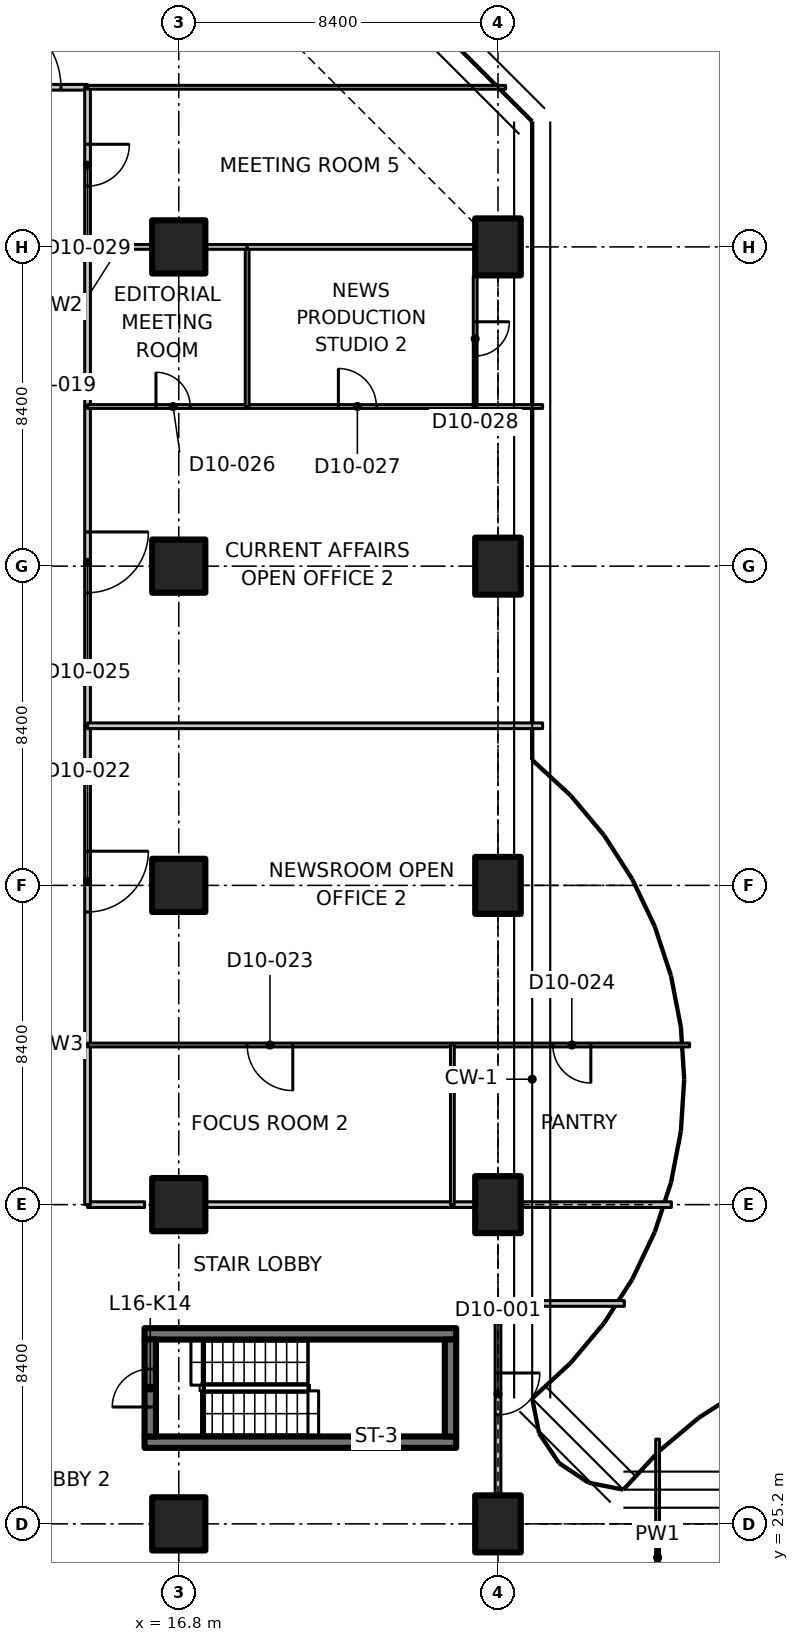
"""IFC4 building model, lengths in metres.
Left out: names, types, materials, properties, quantities, classifications, styles, units other than length and angle.
Written with IfcOpenShell. Run it as: python <this file> out.ifc"""

import sys

from ifc_helpers import new_model, si_unit, direction, frame, frame_2d, origin, origin_2d, place, context, subcontext, project, spatial, polyline, rectangle, outline, extrude, element, fill, save


model = new_model("IFC4")
c1 = context("Model", 3, precision=1e-05, world=origin(), true_north=direction((0.0, 1.0)))
c2 = subcontext(c1, "Body", "Model", "MODEL_VIEW")
j1 = project(units=[si_unit("LENGTHUNIT", "METRE"), si_unit("PLANEANGLEUNIT", "RADIAN")], contexts=[c1])
p1 = place(None, origin())
s1 = spatial("IfcSite", under=j1, at=p1, CompositionType="ELEMENT")
p2 = place(p1, origin())
s2 = spatial("IfcBuilding", under=s1, at=p2, CompositionType="ELEMENT")
p3 = place(p2, frame((0.0, 0.0, 72.5)))
s3 = spatial("IfcBuildingStorey", under=s2, at=p3, CompositionType="ELEMENT", Elevation=72.5)
for number, where, z_axis, x_axis in (
    (1, (16.8, 25.2, 0.0), (0.0, 0.0, 1.0), (1.0, 0.0, 0.0)),
    (2, (16.8, 33.6, 0.0), (0.0, 0.0, 1.0), (1.0, 0.0, 0.0)),
    (3, (16.8, 42.0, 0.0), (0.0, 0.0, 1.0), (1.0, 0.0, 0.0)),
    (4, (16.8, 50.4, 0.0), (0.0, 0.0, 1.0), (1.0, 0.0, 0.0)),
    (5, (16.8, 58.8, 0.0), (0.0, 0.0, 1.0), (1.0, 0.0, 0.0)),
):
    element("IfcColumn", number, at=place(p3, frame(where, z_axis=z_axis, x_axis=x_axis)), inside=s3, PredefinedType="COLUMN", context=c2, shape_type="SweptSolid", body=[
        extrude(rectangle(XDim=1.4, YDim=1.4, at=origin_2d()), origin(), (0.0, 0.0, 1.0), 3.35),
    ])
for number, where, z_axis, x_axis in (
    (6, (25.2, 25.2, 0.0), (0.0, 0.0, 1.0), (1.0, 0.0, 0.0)),
    (7, (25.2, 33.6, 0.0), (0.0, 0.0, 1.0), (1.0, 0.0, 0.0)),
    (8, (25.2, 42.0, 0.0), (0.0, 0.0, 1.0), (1.0, 0.0, 0.0)),
    (9, (25.2, 50.4, 0.0), (0.0, 0.0, 1.0), (1.0, 0.0, 0.0)),
    (10, (25.2, 58.8, 0.0), (0.0, 0.0, 1.0), (1.0, 0.0, 0.0)),
):
    element("IfcColumn", number, at=place(p3, frame(where, z_axis=z_axis, x_axis=x_axis)), inside=s3, PredefinedType="COLUMN", context=c2, shape_type="SweptSolid", body=[
        extrude(rectangle(XDim=1.2, YDim=1.5, at=origin_2d()), origin(), (0.0, 0.0, 1.0), 3.35),
    ])
for number, where, z_axis, x_axis in (
    (11, (15.9, 27.35, 0.0), (0.0, 0.0, 1.0), (1.0, 0.0, 0.0)),
    (12, (15.9, 30.2, 0.0), (0.0, 0.0, 1.0), (1.0, 0.0, 0.0)),
):
    element("IfcWall", number, at=place(p3, frame(where, z_axis=z_axis, x_axis=x_axis)), inside=s3, PredefinedType="SHEAR", context=c2, shape_type="SweptSolid", body=[
        extrude(rectangle(XDim=8.2, YDim=0.3, at=frame_2d((4.1, 0.0))), origin(), (0.0, 0.0, 1.0), 3.35),
    ])
p4 = place(p3, frame((16.05, 27.5, 0.0), z_axis=(0.0, 0.0, 1.0), x_axis=(0.0, 1.0, 0.0)))
e13 = element("IfcWall", 13, at=p4, inside=s3, PredefinedType="SHEAR", context=c2, shape_type="SweptSolid", body=[
    extrude(rectangle(XDim=2.55, YDim=0.3, at=frame_2d((1.275, 0.0))), origin(), (0.0, 0.0, 1.0), 3.35),
])
p5 = place(p4, frame((0.775, 0.0, 0.0)))
e14 = element("IfcOpeningElement", 14, at=p5, cuts=e13, PredefinedType="OPENING", context=c2, shape_type="SweptSolid", body=[
    extrude(rectangle(XDim=1.0, YDim=2.1, at=frame_2d((0.5, 1.05))), frame((0.0, 0.16, 0.0), z_axis=(0.0, -1.0, 0.0), x_axis=(1.0, 0.0, 0.0)), (0.0, 0.0, 1.0), 0.32),
])
p6 = place(p3, frame((23.95, 27.5, 0.0), z_axis=(0.0, 0.0, 1.0), x_axis=(0.0, 1.0, 0.0)))
e15 = element("IfcWall", 15, at=p6, inside=s3, PredefinedType="SHEAR", context=c2, shape_type="SweptSolid", body=[
    extrude(rectangle(XDim=2.55, YDim=0.3, at=frame_2d((1.275, 0.0))), origin(), (0.0, 0.0, 1.0), 3.35),
])
p7 = place(p3, frame((29.4, 27.429, 0.0), z_axis=(0.0, 0.0, 1.0), x_axis=(0.0, -1.0, 0.0)))
e16 = element("IfcWall", 16, at=p7, inside=s3, PredefinedType="PARTITIONING", context=c2, shape_type="SweptSolid", body=[
    extrude(outline(polyline([(0.0, 0.0), (6.229, 0.0), (6.229, 3.33), (2.679, 3.33), (2.677, 2.98), (1.781, 2.98), (1.779, 3.33), (0.154, 3.33), (0.0, 3.33), (0.0, 0.0)])), frame((0.0, 0.05, 0.0), z_axis=(0.0, -1.0, 0.0), x_axis=(1.0, 0.0, 0.0)), (0.0, 0.0, 1.0), 0.1),
])
p8 = place(p3, frame((25.2, 31.0, 0.0), z_axis=(0.0, 0.0, 1.0), x_axis=(0.0, -1.0, 0.0)))
e17 = element("IfcWall", 17, at=p8, inside=s3, PredefinedType="PARTITIONING", context=c2, shape_type="SweptSolid", body=[
    extrude(outline(polyline([(0.0, 0.0), (5.03, 0.0), (5.03, 2.98), (0.0, 2.98), (0.0, 0.0)])), frame((0.0, 0.075, 0.0), z_axis=(0.0, -1.0, 0.0), x_axis=(1.0, 0.0, 0.0)), (0.0, 0.0, 1.0), 0.15),
])
p9 = place(p8, frame((1.83, 0.0, 0.0)))
e18 = element("IfcOpeningElement", 18, at=p9, cuts=e17, PredefinedType="OPENING", context=c2, shape_type="SweptSolid", body=[
    extrude(rectangle(XDim=1.1, YDim=2.1, at=frame_2d((0.55, 1.05))), frame((0.0, 0.085, 0.0), z_axis=(0.0, -1.0, 0.0), x_axis=(1.0, 0.0, 0.0)), (0.0, 0.0, 1.0), 0.17),
])
p10 = place(p3, frame((25.2, 31.0, 0.0), z_axis=(0.0, 0.0, 1.0), x_axis=(1.0, 0.0, 0.0)))
e19 = element("IfcWall", 19, at=p10, inside=s3, PredefinedType="PARTITIONING", context=c2, shape_type="SweptSolid", body=[
    extrude(rectangle(XDim=3.324, YDim=0.15, at=frame_2d((1.662, 0.0))), origin(), (0.0, 0.0, 1.0), 2.98),
])
p11 = place(p3, frame((14.4, 33.6, 0.0), z_axis=(0.0, 0.0, 1.0), x_axis=(1.0, 0.0, 0.0)))
e20 = element("IfcWall", 20, at=p11, inside=s3, PredefinedType="PARTITIONING", context=c2, shape_type="SweptSolid", body=[
    extrude(rectangle(XDim=1.5, YDim=0.15, at=frame_2d((0.75, 0.0))), origin(), (0.0, 0.0, 1.0), 3.33),
])
p12 = place(p3, frame((17.52, 33.6, 0.0), z_axis=(0.0, 0.0, 1.0), x_axis=(1.0, 0.0, 0.0)))
e21 = element("IfcWall", 21, at=p12, inside=s3, PredefinedType="PARTITIONING", context=c2, shape_type="SweptSolid", body=[
    extrude(rectangle(XDim=6.48, YDim=0.15, at=frame_2d((3.24, 0.0))), origin(), (0.0, 0.0, 1.0), 3.33),
])
p13 = place(p3, frame((24.0, 33.6, 0.0), z_axis=(0.0, 0.0, 1.0), x_axis=(1.0, 0.0, 0.0)))
e22 = element("IfcWall", 22, at=p13, inside=s3, PredefinedType="PARTITIONING", context=c2, shape_type="SweptSolid", body=[
    extrude(rectangle(XDim=0.58, YDim=0.15, at=frame_2d((0.29, 0.0))), origin(), (0.0, 0.0, 1.0), 3.33),
])
p14 = place(p3, frame((25.82, 33.6, 0.0), z_axis=(0.0, 0.0, 1.0), x_axis=(1.0, 0.0, 0.0)))
e23 = element("IfcWall", 23, at=p14, inside=s3, PredefinedType="PARTITIONING", context=c2, shape_type="SweptSolid", body=[
    extrude(rectangle(XDim=3.942, YDim=0.15, at=frame_2d((1.971, 0.0))), origin(), (0.0, 0.0, 1.0), 2.98),
])
p15 = place(p3, frame((10.8, 63.0, 0.0), z_axis=(0.0, 0.0, 1.0), x_axis=(1.0, 0.0, 0.0)))
e24 = element("IfcWall", 24, at=p15, inside=s3, PredefinedType="PARTITIONING", context=c2, shape_type="SweptSolid", body=[
    extrude(rectangle(XDim=3.6, YDim=0.15, at=frame_2d((1.8, 0.0))), origin(), (0.0, 0.0, 1.0), 3.33),
])
p16 = place(p15, frame((0.9, 0.0, 0.0)))
e25 = element("IfcOpeningElement", 25, at=p16, cuts=e24, PredefinedType="OPENING", context=c2, shape_type="SweptSolid", body=[
    extrude(rectangle(XDim=2.0, YDim=2.4, at=frame_2d((1.0, 1.2))), frame((0.0, 0.085, 0.0), z_axis=(0.0, -1.0, 0.0), x_axis=(1.0, 0.0, 0.0)), (0.0, 0.0, 1.0), 0.17),
])
p17 = place(p3, frame((14.4, 46.2, 0.0), z_axis=(0.0, 0.0, 1.0), x_axis=(0.0, -1.0, 0.0)))
e26 = element("IfcWall", 26, at=p17, inside=s3, PredefinedType="PARTITIONING", context=c2, shape_type="SweptSolid", body=[
    extrude(rectangle(XDim=8.4, YDim=0.15, at=frame_2d((4.2, 0.0))), origin(), (0.0, 0.0, 1.0), 3.33),
])
p18 = place(p17, frame((3.3, 0.0, 0.0)))
e27 = element("IfcOpeningElement", 27, at=p18, cuts=e26, PredefinedType="OPENING", context=c2, shape_type="SweptSolid", body=[
    extrude(rectangle(XDim=1.6, YDim=2.1, at=frame_2d((0.8, 1.05))), frame((0.0, 0.085, 0.0), z_axis=(0.0, -1.0, 0.0), x_axis=(1.0, 0.0, 0.0)), (0.0, 0.0, 1.0), 0.17),
])
p19 = place(p3, frame((14.4, 37.8, 0.0), z_axis=(0.0, 0.0, 1.0), x_axis=(0.0, -1.0, 0.0)))
e28 = element("IfcWall", 28, at=p19, inside=s3, PredefinedType="PARTITIONING", context=c2, shape_type="SweptSolid", body=[
    extrude(rectangle(XDim=4.2, YDim=0.15, at=frame_2d((2.1, 0.0))), origin(), (0.0, 0.0, 1.0), 3.33),
])
p20 = place(p3, frame((14.4, 54.6, 0.0), z_axis=(0.0, 0.0, 1.0), x_axis=(0.0, -1.0, 0.0)))
e29 = element("IfcWall", 29, at=p20, inside=s3, PredefinedType="PARTITIONING", context=c2, shape_type="SweptSolid", body=[
    extrude(rectangle(XDim=8.4, YDim=0.15, at=frame_2d((4.2, 0.0))), origin(), (0.0, 0.0, 1.0), 3.33),
])
p21 = place(p20, frame((3.3, 0.0, 0.0)))
e30 = element("IfcOpeningElement", 30, at=p21, cuts=e29, PredefinedType="OPENING", context=c2, shape_type="SweptSolid", body=[
    extrude(rectangle(XDim=1.6, YDim=2.1, at=frame_2d((0.8, 1.05))), frame((0.0, 0.085, 0.0), z_axis=(0.0, -1.0, 0.0), x_axis=(1.0, 0.0, 0.0)), (0.0, 0.0, 1.0), 0.17),
])
p22 = place(p3, frame((14.4, 58.8, 0.0), z_axis=(0.0, 0.0, 1.0), x_axis=(0.0, -1.0, 0.0)))
e31 = element("IfcWall", 31, at=p22, inside=s3, PredefinedType="PARTITIONING", context=c2, shape_type="SweptSolid", body=[
    extrude(rectangle(XDim=4.2, YDim=0.15, at=frame_2d((2.1, 0.0))), origin(), (0.0, 0.0, 1.0), 3.33),
])
p23 = place(p3, frame((14.4, 63.0, 0.0), z_axis=(0.0, 0.0, 1.0), x_axis=(0.0, -1.0, 0.0)))
e32 = element("IfcWall", 32, at=p23, inside=s3, PredefinedType="PARTITIONING", context=c2, shape_type="SweptSolid", body=[
    extrude(rectangle(XDim=4.2, YDim=0.15, at=frame_2d((2.1, 0.0))), origin(), (0.0, 0.0, 1.0), 3.33),
])
p24 = place(p23, frame((1.5, 0.0, 0.0)))
e33 = element("IfcOpeningElement", 33, at=p24, cuts=e32, PredefinedType="OPENING", context=c2, shape_type="SweptSolid", body=[
    extrude(rectangle(XDim=1.1, YDim=2.1, at=frame_2d((0.55, 1.05))), frame((0.0, 0.085, 0.0), z_axis=(0.0, -1.0, 0.0), x_axis=(1.0, 0.0, 0.0)), (0.0, 0.0, 1.0), 0.17),
])
p25 = place(p3, frame((25.4, 63.0, 0.0), z_axis=(0.0, 0.0, 1.0), x_axis=(-1.0, 0.0, 0.0)))
e34 = element("IfcWall", 34, at=p25, inside=s3, PredefinedType="PARTITIONING", context=c2, shape_type="SweptSolid", body=[
    extrude(outline(polyline([(0.0, 0.0), (11.0, 0.0), (11.0, 3.33), (5.066, 3.33), (5.064, 2.98), (3.736, 2.98), (3.734, 3.33), (0.0, 3.33), (0.0, 0.0)])), frame((0.0, 0.05, 0.0), z_axis=(0.0, -1.0, 0.0), x_axis=(1.0, 0.0, 0.0)), (0.0, 0.0, 1.0), 0.1),
])
p26 = place(p3, frame((24.0, 37.8, 0.0), z_axis=(0.0, 0.0, 1.0), x_axis=(-1.0, 0.0, 0.0)))
e35 = element("IfcWall", 35, at=p26, inside=s3, PredefinedType="PARTITIONING", context=c2, shape_type="SweptSolid", body=[
    extrude(rectangle(XDim=9.6, YDim=0.1, at=frame_2d((4.8, 0.0))), origin(), (0.0, 0.0, 1.0), 3.33),
])
p27 = place(p26, frame((4.2, 0.0, 0.0)))
e36 = element("IfcOpeningElement", 36, at=p27, cuts=e35, PredefinedType="OPENING", context=c2, shape_type="SweptSolid", body=[
    extrude(rectangle(XDim=1.2, YDim=2.1, at=frame_2d((0.6, 1.05))), frame((0.0, 0.06, 0.0), z_axis=(0.0, -1.0, 0.0), x_axis=(1.0, 0.0, 0.0)), (0.0, 0.0, 1.0), 0.12),
])
p28 = place(p3, frame((30.243, 37.8, 0.0), z_axis=(0.0, 0.0, 1.0), x_axis=(-1.0, 0.0, 0.0)))
e37 = element("IfcWall", 37, at=p28, inside=s3, PredefinedType="PARTITIONING", context=c2, shape_type="SweptSolid", body=[
    extrude(outline(polyline([(0.0, 0.0), (6.243, 0.0), (6.243, 3.33), (5.493, 3.33), (5.491, 2.98), (4.595, 2.98), (4.593, 3.33), (0.0, 3.33), (0.0, 0.0)])), frame((0.0, 0.05, 0.0), z_axis=(0.0, -1.0, 0.0), x_axis=(1.0, 0.0, 0.0)), (0.0, 0.0, 1.0), 0.1),
])
p29 = place(p28, frame((2.6, 0.0, 0.0)))
e38 = element("IfcOpeningElement", 38, at=p29, cuts=e37, PredefinedType="OPENING", context=c2, shape_type="SweptSolid", body=[
    extrude(rectangle(XDim=1.0, YDim=2.1, at=frame_2d((0.5, 1.05))), frame((0.0, 0.06, 0.0), z_axis=(0.0, -1.0, 0.0), x_axis=(1.0, 0.0, 0.0)), (0.0, 0.0, 1.0), 0.12),
])
p30 = place(p3, frame((14.4, 46.2, 0.0), z_axis=(0.0, 0.0, 1.0), x_axis=(1.0, 0.0, 0.0)))
e39 = element("IfcWall", 39, at=p30, inside=s3, PredefinedType="PARTITIONING", context=c2, shape_type="SweptSolid", body=[
    extrude(outline(polyline([(0.0, 0.0), (11.974, 0.0), (11.974, 3.33), (11.9, 3.33), (11.25, 3.33), (11.248, 2.98), (10.352, 2.98), (10.35, 3.33), (0.0, 3.33), (0.0, 0.0)])), frame((0.0, 0.075, 0.0), z_axis=(0.0, -1.0, 0.0), x_axis=(1.0, 0.0, 0.0)), (0.0, 0.0, 1.0), 0.15),
])
p31 = place(p3, frame((24.0, 37.8, 0.0), z_axis=(0.0, 0.0, 1.0), x_axis=(0.0, -1.0, 0.0)))
e40 = element("IfcWall", 40, at=p31, inside=s3, PredefinedType="PARTITIONING", context=c2, shape_type="SweptSolid", body=[
    extrude(rectangle(XDim=4.2, YDim=0.1, at=frame_2d((2.1, 0.0))), origin(), (0.0, 0.0, 1.0), 3.33),
])
p32 = place(p3, frame((14.4, 54.6, 0.0), z_axis=(0.0, 0.0, 1.0), x_axis=(1.0, 0.0, 0.0)))
e41 = element("IfcWall", 41, at=p32, inside=s3, PredefinedType="PARTITIONING", context=c2, shape_type="SweptSolid", body=[
    extrude(rectangle(XDim=4.2, YDim=0.1, at=frame_2d((2.1, 0.0))), origin(), (0.0, 0.0, 1.0), 3.33),
])
p33 = place(p32, frame((1.8, 0.0, 0.0)))
e42 = element("IfcOpeningElement", 42, at=p33, cuts=e41, PredefinedType="OPENING", context=c2, shape_type="SweptSolid", body=[
    extrude(rectangle(XDim=0.9, YDim=2.1, at=frame_2d((0.45, 1.05))), frame((0.0, 0.06, 0.0), z_axis=(0.0, -1.0, 0.0), x_axis=(1.0, 0.0, 0.0)), (0.0, 0.0, 1.0), 0.12),
])
p34 = place(p3, frame((18.6, 54.6, 0.0), z_axis=(0.0, 0.0, 1.0), x_axis=(1.0, 0.0, 0.0)))
e43 = element("IfcWall", 43, at=p34, inside=s3, PredefinedType="PARTITIONING", context=c2, shape_type="SweptSolid", body=[
    extrude(rectangle(XDim=6.0, YDim=0.1, at=frame_2d((3.0, 0.0))), origin(), (0.0, 0.0, 1.0), 3.33),
])
p35 = place(p34, frame((2.4, 0.0, 0.0)))
e44 = element("IfcOpeningElement", 44, at=p35, cuts=e43, PredefinedType="OPENING", context=c2, shape_type="SweptSolid", body=[
    extrude(rectangle(XDim=1.0, YDim=2.1, at=frame_2d((0.5, 1.05))), frame((0.0, 0.06, 0.0), z_axis=(0.0, -1.0, 0.0), x_axis=(1.0, 0.0, 0.0)), (0.0, 0.0, 1.0), 0.12),
])
p36 = place(p3, frame((24.6, 54.6, 0.0), z_axis=(0.0, 0.0, 1.0), x_axis=(1.0, 0.0, 0.0)))
e45 = element("IfcWall", 45, at=p36, inside=s3, PredefinedType="PARTITIONING", context=c2, shape_type="SweptSolid", body=[
    extrude(rectangle(XDim=1.774, YDim=0.1, at=frame_2d((0.887, 0.0))), origin(), (0.0, 0.0, 1.0), 2.98),
])
p37 = place(p3, frame((18.6, 58.8, 0.0), z_axis=(0.0, 0.0, 1.0), x_axis=(0.0, -1.0, 0.0)))
e46 = element("IfcWall", 46, at=p37, inside=s3, PredefinedType="PARTITIONING", context=c2, shape_type="SweptSolid", body=[
    extrude(rectangle(XDim=4.2, YDim=0.1, at=frame_2d((2.1, 0.0))), origin(), (0.0, 0.0, 1.0), 3.33),
])
p38 = place(p3, frame((14.4, 58.8, 0.0), z_axis=(0.0, 0.0, 1.0), x_axis=(1.0, 0.0, 0.0)))
e47 = element("IfcWall", 47, at=p38, inside=s3, PredefinedType="PARTITIONING", context=c2, shape_type="SweptSolid", body=[
    extrude(rectangle(XDim=1.68, YDim=0.125, at=frame_2d((0.84, 0.0))), origin(), (0.0, 0.0, 1.0), 3.33),
])
p39 = place(p3, frame((17.52, 58.8, 0.0), z_axis=(0.0, 0.0, 1.0), x_axis=(1.0, 0.0, 0.0)))
e48 = element("IfcWall", 48, at=p39, inside=s3, PredefinedType="PARTITIONING", context=c2, shape_type="SweptSolid", body=[
    extrude(rectangle(XDim=1.08, YDim=0.125, at=frame_2d((0.54, 0.0))), origin(), (0.0, 0.0, 1.0), 3.33),
])
p40 = place(p3, frame((24.6, 58.03, 0.0), z_axis=(0.0, 0.0, 1.0), x_axis=(0.0, -1.0, 0.0)))
e49 = element("IfcWall", 49, at=p40, inside=s3, PredefinedType="PARTITIONING", context=c2, shape_type="SweptSolid", body=[
    extrude(rectangle(XDim=3.43, YDim=0.1, at=frame_2d((1.715, 0.0))), origin(), (0.0, 0.0, 1.0), 3.33),
])
p41 = place(p40, frame((1.2, 0.0, 0.0)))
e50 = element("IfcOpeningElement", 50, at=p41, cuts=e49, PredefinedType="OPENING", context=c2, shape_type="SweptSolid", body=[
    extrude(rectangle(XDim=0.9, YDim=2.1, at=frame_2d((0.45, 1.05))), frame((0.0, 0.06, 0.0), z_axis=(0.0, -1.0, 0.0), x_axis=(1.0, 0.0, 0.0)), (0.0, 0.0, 1.0), 0.12),
])
p42 = place(p3, frame((18.6, 58.8, 0.0), z_axis=(0.0, 0.0, 1.0), x_axis=(1.0, 0.0, 0.0)))
e51 = element("IfcWall", 51, at=p42, inside=s3, PredefinedType="PARTITIONING", context=c2, shape_type="SweptSolid", body=[
    extrude(rectangle(XDim=5.98, YDim=0.125, at=frame_2d((2.99, 0.0))), origin(), (0.0, 0.0, 1.0), 3.33),
])
p43 = place(p5, origin())
e52 = element("IfcDoor", 52, at=p43, inside=s3, OperationType="SINGLE_SWING_LEFT", PredefinedType="DOOR", context=c2, shape_type="SweptSolid", body=[
    extrude(rectangle(XDim=1.0, YDim=2.1, at=frame_2d((0.5, 1.05))), frame((0.0, 0.025, 0.0), z_axis=(0.0, -1.0, 0.0), x_axis=(1.0, 0.0, 0.0)), (0.0, 0.0, 1.0), 0.05),
])
fill(e14, e52)
p44 = place(p9, origin())
e53 = element("IfcDoor", 53, at=p44, inside=s3, OperationType="SINGLE_SWING_RIGHT", PredefinedType="DOOR", context=c2, shape_type="SweptSolid", body=[
    extrude(rectangle(XDim=1.1, YDim=2.1, at=frame_2d((0.55, 1.05))), frame((0.0, 0.025, 0.0), z_axis=(0.0, -1.0, 0.0), x_axis=(1.0, 0.0, 0.0)), (0.0, 0.0, 1.0), 0.05),
])
fill(e18, e53)
p45 = place(p16, origin())
e54 = element("IfcDoor", 54, at=p45, inside=s3, OperationType="DOUBLE_DOOR_SINGLE_SWING", PredefinedType="DOOR", context=c2, shape_type="SweptSolid", body=[
    extrude(rectangle(XDim=2.0, YDim=2.4, at=frame_2d((1.0, 1.2))), frame((0.0, 0.025, 0.0), z_axis=(0.0, -1.0, 0.0), x_axis=(1.0, 0.0, 0.0)), (0.0, 0.0, 1.0), 0.05),
])
fill(e25, e54)
p46 = place(p18, origin())
e55 = element("IfcDoor", 55, at=p46, inside=s3, OperationType="DOUBLE_DOOR_SINGLE_SWING", PredefinedType="DOOR", context=c2, shape_type="SweptSolid", body=[
    extrude(rectangle(XDim=1.6, YDim=2.1, at=frame_2d((0.8, 1.05))), frame((0.0, 0.025, 0.0), z_axis=(0.0, -1.0, 0.0), x_axis=(1.0, 0.0, 0.0)), (0.0, 0.0, 1.0), 0.05),
])
fill(e27, e55)
p47 = place(p27, origin())
e56 = element("IfcDoor", 56, at=p47, inside=s3, OperationType="SINGLE_SWING_LEFT", PredefinedType="DOOR", context=c2, shape_type="SweptSolid", body=[
    extrude(rectangle(XDim=1.2, YDim=2.1, at=frame_2d((0.6, 1.05))), frame((0.0, 0.025, 0.0), z_axis=(0.0, -1.0, 0.0), x_axis=(1.0, 0.0, 0.0)), (0.0, 0.0, 1.0), 0.05),
])
fill(e36, e56)
p48 = place(p29, origin())
e57 = element("IfcDoor", 57, at=p48, inside=s3, OperationType="SINGLE_SWING_LEFT", PredefinedType="DOOR", context=c2, shape_type="SweptSolid", body=[
    extrude(rectangle(XDim=1.0, YDim=2.1, at=frame_2d((0.5, 1.05))), frame((0.0, 0.025, 0.0), z_axis=(0.0, -1.0, 0.0), x_axis=(1.0, 0.0, 0.0)), (0.0, 0.0, 1.0), 0.05),
])
fill(e38, e57)
p49 = place(p21, origin())
e58 = element("IfcDoor", 58, at=p49, inside=s3, OperationType="DOUBLE_DOOR_SINGLE_SWING", PredefinedType="DOOR", context=c2, shape_type="SweptSolid", body=[
    extrude(rectangle(XDim=1.6, YDim=2.1, at=frame_2d((0.8, 1.05))), frame((0.0, 0.025, 0.0), z_axis=(0.0, -1.0, 0.0), x_axis=(1.0, 0.0, 0.0)), (0.0, 0.0, 1.0), 0.05),
])
fill(e30, e58)
p50 = place(p33, origin())
e59 = element("IfcDoor", 59, at=p50, inside=s3, OperationType="SINGLE_SWING_LEFT", PredefinedType="DOOR", context=c2, shape_type="SweptSolid", body=[
    extrude(rectangle(XDim=0.9, YDim=2.1, at=frame_2d((0.45, 1.05))), frame((0.0, 0.025, 0.0), z_axis=(0.0, -1.0, 0.0), x_axis=(1.0, 0.0, 0.0)), (0.0, 0.0, 1.0), 0.05),
])
fill(e42, e59)
p51 = place(p35, origin())
e60 = element("IfcDoor", 60, at=p51, inside=s3, OperationType="SINGLE_SWING_LEFT", PredefinedType="DOOR", context=c2, shape_type="SweptSolid", body=[
    extrude(rectangle(XDim=1.0, YDim=2.1, at=frame_2d((0.5, 1.05))), frame((0.0, 0.025, 0.0), z_axis=(0.0, -1.0, 0.0), x_axis=(1.0, 0.0, 0.0)), (0.0, 0.0, 1.0), 0.05),
])
fill(e44, e60)
p52 = place(p41, origin())
e61 = element("IfcDoor", 61, at=p52, inside=s3, OperationType="SINGLE_SWING_LEFT", PredefinedType="DOOR", context=c2, shape_type="SweptSolid", body=[
    extrude(rectangle(XDim=0.9, YDim=2.1, at=frame_2d((0.45, 1.05))), frame((0.0, 0.025, 0.0), z_axis=(0.0, -1.0, 0.0), x_axis=(1.0, 0.0, 0.0)), (0.0, 0.0, 1.0), 0.05),
])
fill(e50, e61)
p53 = place(p24, origin())
e62 = element("IfcDoor", 62, at=p53, inside=s3, OperationType="SINGLE_SWING_LEFT", PredefinedType="DOOR", context=c2, shape_type="SweptSolid", body=[
    extrude(rectangle(XDim=1.1, YDim=2.1, at=frame_2d((0.55, 1.05))), frame((0.0, 0.025, 0.0), z_axis=(0.0, -1.0, 0.0), x_axis=(1.0, 0.0, 0.0)), (0.0, 0.0, 1.0), 0.05),
])
fill(e33, e62)
save(model, sys.argv[1])
